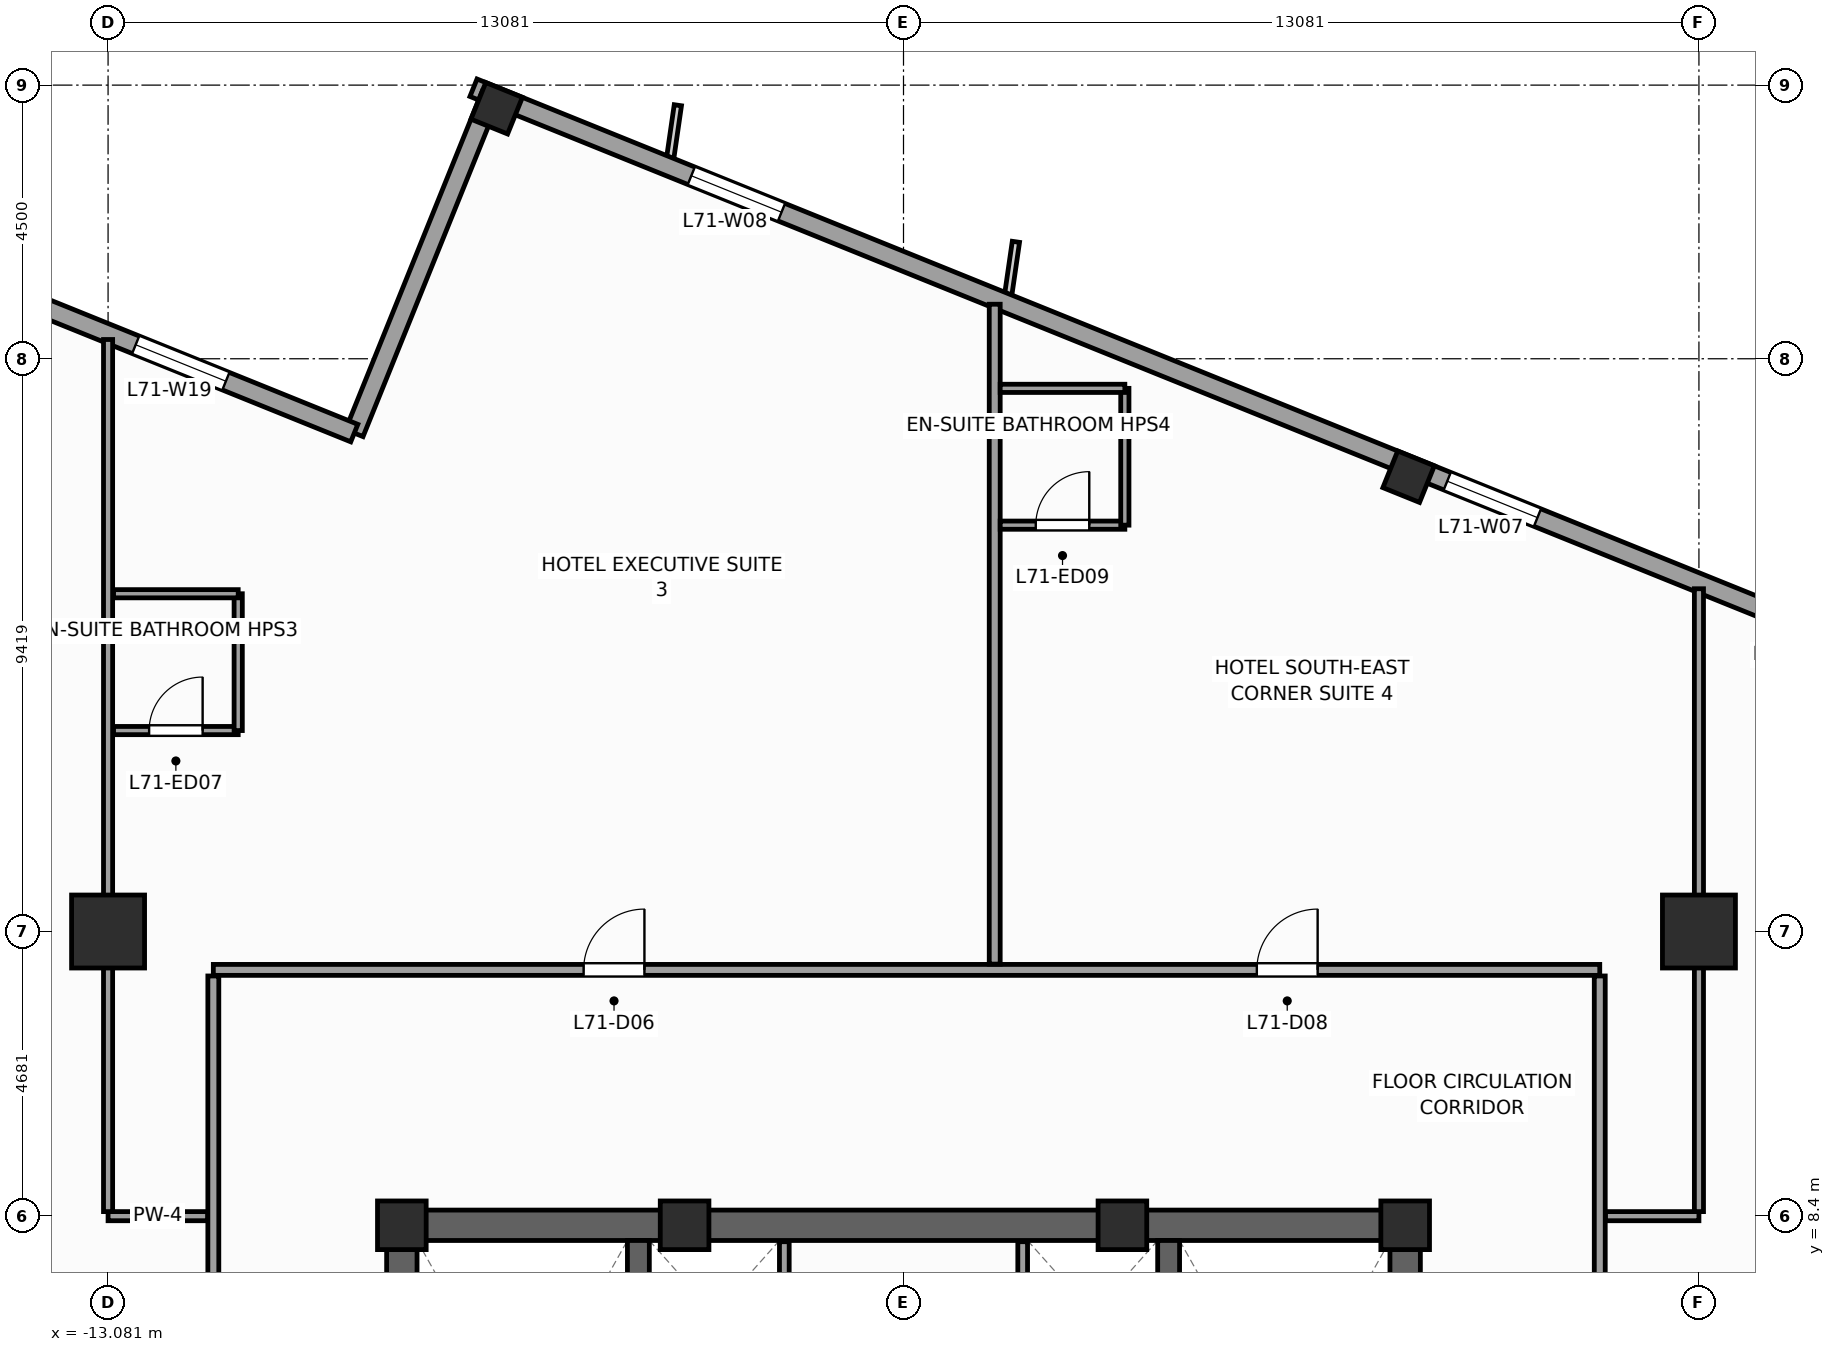
"""IFC4 building model, lengths in metres.
Left out: names, types, materials, properties, quantities, classifications, styles, units other than length and angle.
Written with IfcOpenShell. Run it as: python <this file> out.ifc"""

import sys

from ifc_helpers import new_model, si_unit, direction, frame, frame_2d, origin, origin_2d, place, context, subcontext, project, spatial, rectangle, extrude, source, transform, mapped, element, fill, save


model = new_model("IFC4")
c1 = context("Model", 3, precision=1e-05, world=origin(), true_north=direction((0.0, 1.0)))
c2 = subcontext(c1, "Body", "Model", "MODEL_VIEW")
j1 = project(units=[si_unit("LENGTHUNIT", "METRE"), si_unit("PLANEANGLEUNIT", "RADIAN")], contexts=[c1])
p1 = place(None, origin())
s1 = spatial("IfcSite", under=j1, at=p1, CompositionType="ELEMENT")
p2 = place(p1, origin())
s2 = spatial("IfcBuilding", under=s1, at=p2, CompositionType="ELEMENT")
p3 = place(p2, frame((0.0, 0.0, 290.4)))
s3 = spatial("IfcBuildingStorey", under=s2, at=p3, CompositionType="ELEMENT", Elevation=290.4)
p4 = place(p3, frame((-8.5, 8.25, 0.0), z_axis=(0.0, 0.0, 1.0), x_axis=(1.0, 0.0, 0.0)))
e1 = element("IfcWall", 1, at=p4, inside=s3, PredefinedType="SHEAR", context=c2, shape_type="SweptSolid", body=[
    extrude(rectangle(XDim=17.0, YDim=0.5, at=frame_2d((8.5, 0.0))), origin(), (0.0, 0.0, 1.0), 3.6),
])
p5 = place(p3, frame((-8.25, -8.0, 0.0), z_axis=(0.0, 0.0, 1.0), x_axis=(0.0, 1.0, 0.0)))
e2 = element("IfcWall", 2, at=p5, inside=s3, PredefinedType="SHEAR", context=c2, shape_type="SweptSolid", body=[
    extrude(rectangle(XDim=16.0, YDim=0.5, at=frame_2d((8.0, 0.0))), origin(), (0.0, 0.0, 1.0), 3.6),
])
p6 = place(p5, frame((4.69, 0.0, 0.0)))
e3 = element("IfcOpeningElement", 3, at=p6, cuts=e2, PredefinedType="OPENING", context=c2, shape_type="SweptSolid", body=[
    extrude(rectangle(XDim=1.3, YDim=2.2, at=frame_2d((0.65, 1.1))), frame((0.0, 0.26, 0.0), z_axis=(0.0, -1.0, 0.0), x_axis=(1.0, 0.0, 0.0)), (0.0, 0.0, 1.0), 0.52),
])
p7 = place(p3, frame((8.25, -8.0, 0.0), z_axis=(0.0, 0.0, 1.0), x_axis=(0.0, 1.0, 0.0)))
e4 = element("IfcWall", 4, at=p7, inside=s3, PredefinedType="SHEAR", context=c2, shape_type="SweptSolid", body=[
    extrude(rectangle(XDim=16.0, YDim=0.5, at=frame_2d((8.0, 0.0))), origin(), (0.0, 0.0, 1.0), 3.6),
])
p8 = place(p7, frame((4.69, 0.0, 0.0)))
e5 = element("IfcOpeningElement", 5, at=p8, cuts=e4, PredefinedType="OPENING", context=c2, shape_type="SweptSolid", body=[
    extrude(rectangle(XDim=1.3, YDim=2.2, at=frame_2d((0.65, 1.1))), frame((0.0, 0.26, 0.0), z_axis=(0.0, -1.0, 0.0), x_axis=(1.0, 0.0, 0.0)), (0.0, 0.0, 1.0), 0.52),
])
for number, where, z_axis, x_axis in (
    (6, (-4.36, -8.0, 0.0), (0.0, 0.0, 1.0), (0.0, 1.0, 0.0)),
    (7, (4.36, -8.0, 0.0), (0.0, 0.0, 1.0), (0.0, 1.0, 0.0)),
):
    element("IfcWall", number, at=place(p3, frame(where, z_axis=z_axis, x_axis=x_axis)), inside=s3, PredefinedType="SHEAR", context=c2, shape_type="SweptSolid", body=[
        extrude(rectangle(XDim=16.0, YDim=0.36, at=frame_2d((8.0, 0.0))), origin(), (0.0, 0.0, 1.0), 3.6),
    ])
m1 = source(origin(), c2, "Body", "SweptSolid", [
    extrude(rectangle(XDim=0.8, YDim=0.8, at=origin_2d()), origin(), (0.0, 0.0, 1.0), 3.6),
])
for number, where, z_axis, x_axis in (
    (8, (8.25, 8.25, 0.0), (0.0, 0.0, 1.0), (1.0, 0.0, 0.0)),
    (9, (-8.25, 8.25, 0.0), (0.0, 0.0, 1.0), (1.0, 0.0, 0.0)),
    (10, (-3.6, 8.25, 0.0), (0.0, 0.0, 1.0), (1.0, 0.0, 0.0)),
    (11, (3.6, 8.25, 0.0), (0.0, 0.0, 1.0), (1.0, 0.0, 0.0)),
):
    element("IfcColumn", number, at=place(p3, frame(where, z_axis=z_axis, x_axis=x_axis)), inside=s3, PredefinedType="PILASTER", context=c2, shape_type="MappedRepresentation", body=[
        mapped(m1, transform((0.0, 0.0, 0.0), scale=1.0)),
    ])
m2 = source(origin(), c2, "Body", "SweptSolid", [
    extrude(rectangle(XDim=1.2, YDim=1.2, at=origin_2d()), origin(), (0.0, 0.0, 1.0), 3.6),
])
for number, where, z_axis, x_axis in (
    (12, (13.081, 13.081, 0.0), (0.0, 0.0, 1.0), (1.0, 0.0, 0.0)),
    (13, (-13.081, 13.081, 0.0), (0.0, 0.0, 1.0), (1.0, 0.0, 0.0)),
):
    element("IfcColumn", number, at=place(p3, frame(where, z_axis=z_axis, x_axis=x_axis)), inside=s3, PredefinedType="COLUMN", context=c2, shape_type="MappedRepresentation", body=[
        mapped(m2, transform((0.0, 0.0, 0.0), scale=1.0)),
    ])
m3 = source(origin(), c2, "Body", "SweptSolid", [
    extrude(rectangle(XDim=0.65, YDim=0.65, at=origin_2d()), origin(), (0.0, 0.0, 1.0), 3.6),
])
for number, where, z_axis, x_axis in (
    (14, (8.307, 20.56, 0.0), (0.0, 0.0, 1.0), (0.375, 0.927, 0.0)),
    (15, (-6.69, 26.62, 0.0), (0.0, 0.0, 1.0), (0.375, 0.927, 0.0)),
):
    element("IfcColumn", number, at=place(p3, frame(where, z_axis=z_axis, x_axis=x_axis)), inside=s3, PredefinedType="COLUMN", context=c2, shape_type="MappedRepresentation", body=[
        mapped(m3, transform((0.0, 0.0, 0.0), scale=1.0)),
    ])
p9 = place(p3, frame((23.813, 14.479, 0.0), z_axis=(0.0, 0.0, 1.0), x_axis=(-0.927182657188, 0.374609557019, 0.0)))
e16 = element("IfcWall", 16, at=p9, inside=s3, PredefinedType="STANDARD", context=c2, shape_type="SweptSolid", body=[
    extrude(rectangle(XDim=33.31, YDim=0.31, at=frame_2d((16.655, 0.0))), origin(), (0.0, 0.0, 1.0), 2.75),
])
p10 = place(p9, frame((3.197, 0.0, 0.47)))
e17 = element("IfcOpeningElement", 17, at=p10, cuts=e16, PredefinedType="OPENING", context=c2, shape_type="SweptSolid", body=[
    extrude(rectangle(XDim=1.6, YDim=2.1, at=frame_2d((0.8, 1.05))), frame((0.0, 0.165, 0.0), z_axis=(0.0, -1.0, 0.0), x_axis=(1.0, 0.0, 0.0)), (0.0, 0.0, 1.0), 0.33),
])
p11 = place(p9, frame((8.86, 0.0, 0.47)))
e18 = element("IfcOpeningElement", 18, at=p11, cuts=e16, PredefinedType="OPENING", context=c2, shape_type="SweptSolid", body=[
    extrude(rectangle(XDim=1.6, YDim=2.1, at=frame_2d((0.8, 1.05))), frame((0.0, 0.165, 0.0), z_axis=(0.0, -1.0, 0.0), x_axis=(1.0, 0.0, 0.0)), (0.0, 0.0, 1.0), 0.33),
])
p12 = place(p9, frame((14.439, 0.0, 0.47)))
e19 = element("IfcOpeningElement", 19, at=p12, cuts=e16, PredefinedType="OPENING", context=c2, shape_type="SweptSolid", body=[
    extrude(rectangle(XDim=1.6, YDim=2.1, at=frame_2d((0.8, 1.05))), frame((0.0, 0.165, 0.0), z_axis=(0.0, -1.0, 0.0), x_axis=(1.0, 0.0, 0.0)), (0.0, 0.0, 1.0), 0.33),
])
p13 = place(p9, frame((27.847, 0.0, 0.47)))
e20 = element("IfcOpeningElement", 20, at=p13, cuts=e16, PredefinedType="OPENING", context=c2, shape_type="SweptSolid", body=[
    extrude(rectangle(XDim=1.6, YDim=2.1, at=frame_2d((0.8, 1.05))), frame((0.0, 0.165, 0.0), z_axis=(0.0, -1.0, 0.0), x_axis=(1.0, 0.0, 0.0)), (0.0, 0.0, 1.0), 0.33),
])
p14 = place(p3, frame((-6.784, 26.841, 0.0), z_axis=(0.0, 0.0, 1.0), x_axis=(-0.374636620962, -0.927171722085, 0.0)))
e21 = element("IfcWall", 21, at=p14, inside=s3, PredefinedType="STANDARD", context=c2, shape_type="SweptSolid", body=[
    extrude(rectangle(XDim=6.0, YDim=0.31, at=frame_2d((3.0, 0.0))), origin(), (0.0, 0.0, 1.0), 2.65),
])
p15 = place(p3, frame((-9.032, 21.278, 0.0), z_axis=(0.0, 0.0, 1.0), x_axis=(-0.927185411764, 0.374602739196, 0.0)))
e22 = element("IfcWall", 22, at=p15, inside=s3, PredefinedType="STANDARD", context=c2, shape_type="SweptSolid", body=[
    extrude(rectangle(XDim=6.155, YDim=0.31, at=frame_2d((3.078, 0.0))), origin(), (0.0, 0.0, 1.0), 3.35),
])
p16 = place(p15, frame((2.278, 0.0, 0.47)))
e23 = element("IfcOpeningElement", 23, at=p16, cuts=e22, PredefinedType="OPENING", context=c2, shape_type="SweptSolid", body=[
    extrude(rectangle(XDim=1.6, YDim=2.1, at=frame_2d((0.8, 1.05))), frame((0.0, 0.165, 0.0), z_axis=(0.0, -1.0, 0.0), x_axis=(1.0, 0.0, 0.0)), (0.0, 0.0, 1.0), 0.33),
])
for number, where, z_axis, x_axis in (
    (24, (-1.96, 4.58, 0.0), (0.0, 0.0, 1.0), (0.0, 1.0, 0.0)),
    (25, (1.96, 4.58, 0.0), (0.0, 0.0, 1.0), (0.0, 1.0, 0.0)),
):
    element("IfcWall", number, at=place(p3, frame(where, z_axis=z_axis, x_axis=x_axis)), inside=s3, PredefinedType="PARTITIONING", context=c2, shape_type="SweptSolid", body=[
        extrude(rectangle(XDim=3.4, YDim=0.16, at=frame_2d((1.7, 0.0))), origin(), (0.0, 0.0, 1.0), 3.35),
    ])
p17 = place(p3, frame((-11.35, 12.45, 0.0), z_axis=(0.0, 0.0, 1.0), x_axis=(1.0, 0.0, 0.0)))
e26 = element("IfcWall", 26, at=p17, inside=s3, PredefinedType="PARTITIONING", context=c2, shape_type="SweptSolid", body=[
    extrude(rectangle(XDim=22.8, YDim=0.18, at=frame_2d((11.4, 0.0))), origin(), (0.0, 0.0, 1.0), 3.35),
])
p18 = place(p17, frame((6.089, 0.0, 0.0)))
e27 = element("IfcOpeningElement", 27, at=p18, cuts=e26, PredefinedType="OPENING", context=c2, shape_type="SweptSolid", body=[
    extrude(rectangle(XDim=1.0, YDim=2.15, at=frame_2d((0.5, 1.075))), frame((0.0, 0.1, 0.0), z_axis=(0.0, -1.0, 0.0), x_axis=(1.0, 0.0, 0.0)), (0.0, 0.0, 1.0), 0.2),
])
p19 = place(p17, frame((17.161, 0.0, 0.0)))
e28 = element("IfcOpeningElement", 28, at=p19, cuts=e26, PredefinedType="OPENING", context=c2, shape_type="SweptSolid", body=[
    extrude(rectangle(XDim=1.0, YDim=2.15, at=frame_2d((0.5, 1.075))), frame((0.0, 0.1, 0.0), z_axis=(0.0, -1.0, 0.0), x_axis=(1.0, 0.0, 0.0)), (0.0, 0.0, 1.0), 0.2),
])
p20 = place(p3, frame((-11.35, -10.2, 0.0), z_axis=(0.0, 0.0, 1.0), x_axis=(0.0, 1.0, 0.0)))
e29 = element("IfcWall", 29, at=p20, inside=s3, PredefinedType="PARTITIONING", context=c2, shape_type="SweptSolid", body=[
    extrude(rectangle(XDim=22.55, YDim=0.18, at=frame_2d((11.275, 0.0))), origin(), (0.0, 0.0, 1.0), 3.35),
])
p21 = place(p20, frame((11.6, 0.0, 0.0)))
e30 = element("IfcOpeningElement", 30, at=p21, cuts=e29, PredefinedType="OPENING", context=c2, shape_type="SweptSolid", body=[
    extrude(rectangle(XDim=1.0, YDim=2.15, at=frame_2d((0.5, 1.075))), frame((0.0, 0.1, 0.0), z_axis=(0.0, -1.0, 0.0), x_axis=(1.0, 0.0, 0.0)), (0.0, 0.0, 1.0), 0.2),
])
p22 = place(p20, frame((15.8, 0.0, 0.0)))
e31 = element("IfcOpeningElement", 31, at=p22, cuts=e29, PredefinedType="OPENING", context=c2, shape_type="SweptSolid", body=[
    extrude(rectangle(XDim=1.0, YDim=2.15, at=frame_2d((0.5, 1.075))), frame((0.0, 0.1, 0.0), z_axis=(0.0, -1.0, 0.0), x_axis=(1.0, 0.0, 0.0)), (0.0, 0.0, 1.0), 0.2),
])
p23 = place(p20, frame((3.6, 0.0, 0.0)))
e32 = element("IfcOpeningElement", 32, at=p23, cuts=e29, PredefinedType="OPENING", context=c2, shape_type="SweptSolid", body=[
    extrude(rectangle(XDim=1.0, YDim=2.15, at=frame_2d((0.5, 1.075))), frame((0.0, 0.1, 0.0), z_axis=(0.0, -1.0, 0.0), x_axis=(1.0, 0.0, 0.0)), (0.0, 0.0, 1.0), 0.2),
])
p24 = place(p20, frame((7.8, 0.0, 0.0)))
e33 = element("IfcOpeningElement", 33, at=p24, cuts=e29, PredefinedType="OPENING", context=c2, shape_type="SweptSolid", body=[
    extrude(rectangle(XDim=1.0, YDim=2.15, at=frame_2d((0.5, 1.075))), frame((0.0, 0.1, 0.0), z_axis=(0.0, -1.0, 0.0), x_axis=(1.0, 0.0, 0.0)), (0.0, 0.0, 1.0), 0.2),
])
p25 = place(p3, frame((11.45, -10.2, 0.0), z_axis=(0.0, 0.0, 1.0), x_axis=(0.0, 1.0, 0.0)))
e34 = element("IfcWall", 34, at=p25, inside=s3, PredefinedType="PARTITIONING", context=c2, shape_type="SweptSolid", body=[
    extrude(rectangle(XDim=22.55, YDim=0.18, at=frame_2d((11.275, 0.0))), origin(), (0.0, 0.0, 1.0), 3.35),
])
p26 = place(p25, frame((13.9, 0.0, 0.0)))
e35 = element("IfcOpeningElement", 35, at=p26, cuts=e34, PredefinedType="OPENING", context=c2, shape_type="SweptSolid", body=[
    extrude(rectangle(XDim=1.0, YDim=2.15, at=frame_2d((0.5, 1.075))), frame((0.0, 0.1, 0.0), z_axis=(0.0, -1.0, 0.0), x_axis=(1.0, 0.0, 0.0)), (0.0, 0.0, 1.0), 0.2),
])
p27 = place(p25, frame((5.5, 0.0, 0.0)))
e36 = element("IfcOpeningElement", 36, at=p27, cuts=e34, PredefinedType="OPENING", context=c2, shape_type="SweptSolid", body=[
    extrude(rectangle(XDim=1.0, YDim=2.15, at=frame_2d((0.5, 1.075))), frame((0.0, 0.1, 0.0), z_axis=(0.0, -1.0, 0.0), x_axis=(1.0, 0.0, 0.0)), (0.0, 0.0, 1.0), 0.2),
])
p28 = place(p3, frame((1.5, 12.545, 0.0), z_axis=(0.0, 0.0, 1.0), x_axis=(0.0, 1.0, 0.0)))
e37 = element("IfcWall", 37, at=p28, inside=s3, PredefinedType="PARTITIONING", context=c2, shape_type="SweptSolid", body=[
    extrude(rectangle(XDim=10.852, YDim=0.18, at=frame_2d((5.426, 0.0))), origin(), (0.0, 0.0, 1.0), 3.35),
])
p29 = place(p3, frame((-11.445, 8.4, 0.0), z_axis=(0.0, 0.0, 1.0), x_axis=(-1.0, 0.0, 0.0)))
e38 = element("IfcWall", 38, at=p29, inside=s3, PredefinedType="PARTITIONING", context=c2, shape_type="SweptSolid", body=[
    extrude(rectangle(XDim=1.636, YDim=0.15, at=frame_2d((0.818, 0.0))), origin(), (0.0, 0.0, 1.0), 3.35),
])
p30 = place(p3, frame((-13.081, 8.475, 0.0), z_axis=(0.0, 0.0, 1.0), x_axis=(0.0, 1.0, 0.0)))
e39 = element("IfcWall", 39, at=p30, inside=s3, PredefinedType="PARTITIONING", context=c2, shape_type="SweptSolid", body=[
    extrude(rectangle(XDim=14.342, YDim=0.15, at=frame_2d((7.171, 0.0))), origin(), (0.0, 0.0, 1.0), 2.45),
])
p31 = place(p3, frame((11.545, 8.4, 0.0), z_axis=(0.0, 0.0, 1.0), x_axis=(1.0, 0.0, 0.0)))
e40 = element("IfcWall", 40, at=p31, inside=s3, PredefinedType="PARTITIONING", context=c2, shape_type="SweptSolid", body=[
    extrude(rectangle(XDim=1.536, YDim=0.15, at=frame_2d((0.768, 0.0))), origin(), (0.0, 0.0, 1.0), 3.35),
])
p32 = place(p3, frame((13.081, 8.475, 0.0), z_axis=(0.0, 0.0, 1.0), x_axis=(0.0, 1.0, 0.0)))
e41 = element("IfcWall", 41, at=p32, inside=s3, PredefinedType="PARTITIONING", context=c2, shape_type="SweptSolid", body=[
    extrude(rectangle(XDim=10.243, YDim=0.15, at=frame_2d((5.121, 0.0))), origin(), (0.0, 0.0, 1.0), 2.45),
])
p33 = place(p3, frame((-12.991, 16.386, 0.0), z_axis=(0.0, 0.0, 1.0), x_axis=(1.0, 0.0, 0.0)))
e42 = element("IfcWall", 42, at=p33, inside=s3, PredefinedType="PARTITIONING", context=c2, shape_type="SweptSolid", body=[
    extrude(rectangle(XDim=2.05, YDim=0.135, at=frame_2d((1.025, 0.0))), origin(), (0.0, 0.0, 1.0), 3.35),
])
p34 = place(p33, frame((0.585, 0.0, 0.0)))
e43 = element("IfcOpeningElement", 43, at=p34, cuts=e42, PredefinedType="OPENING", context=c2, shape_type="SweptSolid", body=[
    extrude(rectangle(XDim=0.88, YDim=2.1, at=frame_2d((0.44, 1.05))), frame((0.0, 0.078, 0.0), z_axis=(0.0, -1.0, 0.0), x_axis=(1.0, 0.0, 0.0)), (0.0, 0.0, 1.0), 0.155),
])
p35 = place(p3, frame((-10.941, 16.386, 0.0), z_axis=(0.0, 0.0, 1.0), x_axis=(0.0, 1.0, 0.0)))
e44 = element("IfcWall", 44, at=p35, inside=s3, PredefinedType="PARTITIONING", context=c2, shape_type="SweptSolid", body=[
    extrude(rectangle(XDim=2.25, YDim=0.135, at=frame_2d((1.125, 0.0))), origin(), (0.0, 0.0, 1.0), 3.35),
])
p36 = place(p3, frame((-12.991, 18.636, 0.0), z_axis=(0.0, 0.0, 1.0), x_axis=(1.0, 0.0, 0.0)))
e45 = element("IfcWall", 45, at=p36, inside=s3, PredefinedType="PARTITIONING", context=c2, shape_type="SweptSolid", body=[
    extrude(rectangle(XDim=2.05, YDim=0.135, at=frame_2d((1.025, 0.0))), origin(), (0.0, 0.0, 1.0), 3.35),
])
p37 = place(p3, frame((1.59, 19.763, 0.0), z_axis=(0.0, 0.0, 1.0), x_axis=(1.0, 0.0, 0.0)))
e46 = element("IfcWall", 46, at=p37, inside=s3, PredefinedType="PARTITIONING", context=c2, shape_type="SweptSolid", body=[
    extrude(rectangle(XDim=2.05, YDim=0.135, at=frame_2d((1.025, 0.0))), origin(), (0.0, 0.0, 1.0), 3.35),
])
p38 = place(p37, frame((0.585, 0.0, 0.0)))
e47 = element("IfcOpeningElement", 47, at=p38, cuts=e46, PredefinedType="OPENING", context=c2, shape_type="SweptSolid", body=[
    extrude(rectangle(XDim=0.88, YDim=2.1, at=frame_2d((0.44, 1.05))), frame((0.0, 0.078, 0.0), z_axis=(0.0, -1.0, 0.0), x_axis=(1.0, 0.0, 0.0)), (0.0, 0.0, 1.0), 0.155),
])
p39 = place(p3, frame((3.64, 19.763, 0.0), z_axis=(0.0, 0.0, 1.0), x_axis=(0.0, 1.0, 0.0)))
e48 = element("IfcWall", 48, at=p39, inside=s3, PredefinedType="PARTITIONING", context=c2, shape_type="SweptSolid", body=[
    extrude(rectangle(XDim=2.25, YDim=0.135, at=frame_2d((1.125, 0.0))), origin(), (0.0, 0.0, 1.0), 3.35),
])
p40 = place(p3, frame((1.59, 22.013, 0.0), z_axis=(0.0, 0.0, 1.0), x_axis=(1.0, 0.0, 0.0)))
e49 = element("IfcWall", 49, at=p40, inside=s3, PredefinedType="PARTITIONING", context=c2, shape_type="SweptSolid", body=[
    extrude(rectangle(XDim=2.05, YDim=0.135, at=frame_2d((1.025, 0.0))), origin(), (0.0, 0.0, 1.0), 3.35),
])
m4 = source(origin(), c2, "Body", "SweptSolid", [
    extrude(rectangle(XDim=1.6, YDim=2.1, at=frame_2d((0.8, 1.05))), frame((0.0, 0.03, 0.0), z_axis=(0.0, -1.0, 0.0), x_axis=(1.0, 0.0, 0.0)), (0.0, 0.0, 1.0), 0.06),
])
p41 = place(p12, origin())
e50 = element("IfcWindow", 50, at=p41, inside=s3, PartitioningType="SINGLE_PANEL", PredefinedType="WINDOW", context=c2, shape_type="MappedRepresentation", body=[
    mapped(m4, transform((0.0, 0.0, 0.0), scale=1.0)),
])
fill(e19, e50)
p42 = place(p13, origin())
e51 = element("IfcWindow", 51, at=p42, inside=s3, PartitioningType="SINGLE_PANEL", PredefinedType="WINDOW", context=c2, shape_type="MappedRepresentation", body=[
    mapped(m4, transform((0.0, 0.0, 0.0), scale=1.0)),
])
fill(e20, e51)
p43 = place(p16, origin())
e52 = element("IfcWindow", 52, at=p43, inside=s3, PartitioningType="SINGLE_PANEL", PredefinedType="WINDOW", context=c2, shape_type="MappedRepresentation", body=[
    mapped(m4, transform((0.0, 0.0, 0.0), scale=1.0)),
])
fill(e23, e52)
m5 = source(origin(), c2, "Body", "SweptSolid", [
    extrude(rectangle(XDim=1.0, YDim=2.15, at=frame_2d((0.5, 1.075))), frame((0.0, 0.025, 0.0), z_axis=(0.0, -1.0, 0.0), x_axis=(1.0, 0.0, 0.0)), (0.0, 0.0, 1.0), 0.05),
])
p44 = place(p18, origin())
e53 = element("IfcDoor", 53, at=p44, inside=s3, OperationType="SINGLE_SWING_RIGHT", PredefinedType="DOOR", context=c2, shape_type="MappedRepresentation", body=[
    mapped(m5, transform((0.0, 0.0, 0.0), scale=1.0)),
])
fill(e27, e53)
m6 = source(origin(), c2, "Body", "SweptSolid", [
    extrude(rectangle(XDim=0.88, YDim=2.1, at=frame_2d((0.44, 1.05))), frame((0.0, 0.025, 0.0), z_axis=(0.0, -1.0, 0.0), x_axis=(1.0, 0.0, 0.0)), (0.0, 0.0, 1.0), 0.05),
])
p45 = place(p34, origin())
e54 = element("IfcDoor", 54, at=p45, inside=s3, OperationType="SINGLE_SWING_RIGHT", PredefinedType="DOOR", context=c2, shape_type="MappedRepresentation", body=[
    mapped(m6, transform((0.0, 0.0, 0.0), scale=1.0)),
])
fill(e43, e54)
p46 = place(p19, origin())
e55 = element("IfcDoor", 55, at=p46, inside=s3, OperationType="SINGLE_SWING_RIGHT", PredefinedType="DOOR", context=c2, shape_type="MappedRepresentation", body=[
    mapped(m5, transform((0.0, 0.0, 0.0), scale=1.0)),
])
fill(e28, e55)
p47 = place(p38, origin())
e56 = element("IfcDoor", 56, at=p47, inside=s3, OperationType="SINGLE_SWING_RIGHT", PredefinedType="DOOR", context=c2, shape_type="MappedRepresentation", body=[
    mapped(m6, transform((0.0, 0.0, 0.0), scale=1.0)),
])
fill(e47, e56)
save(model, sys.argv[1])
